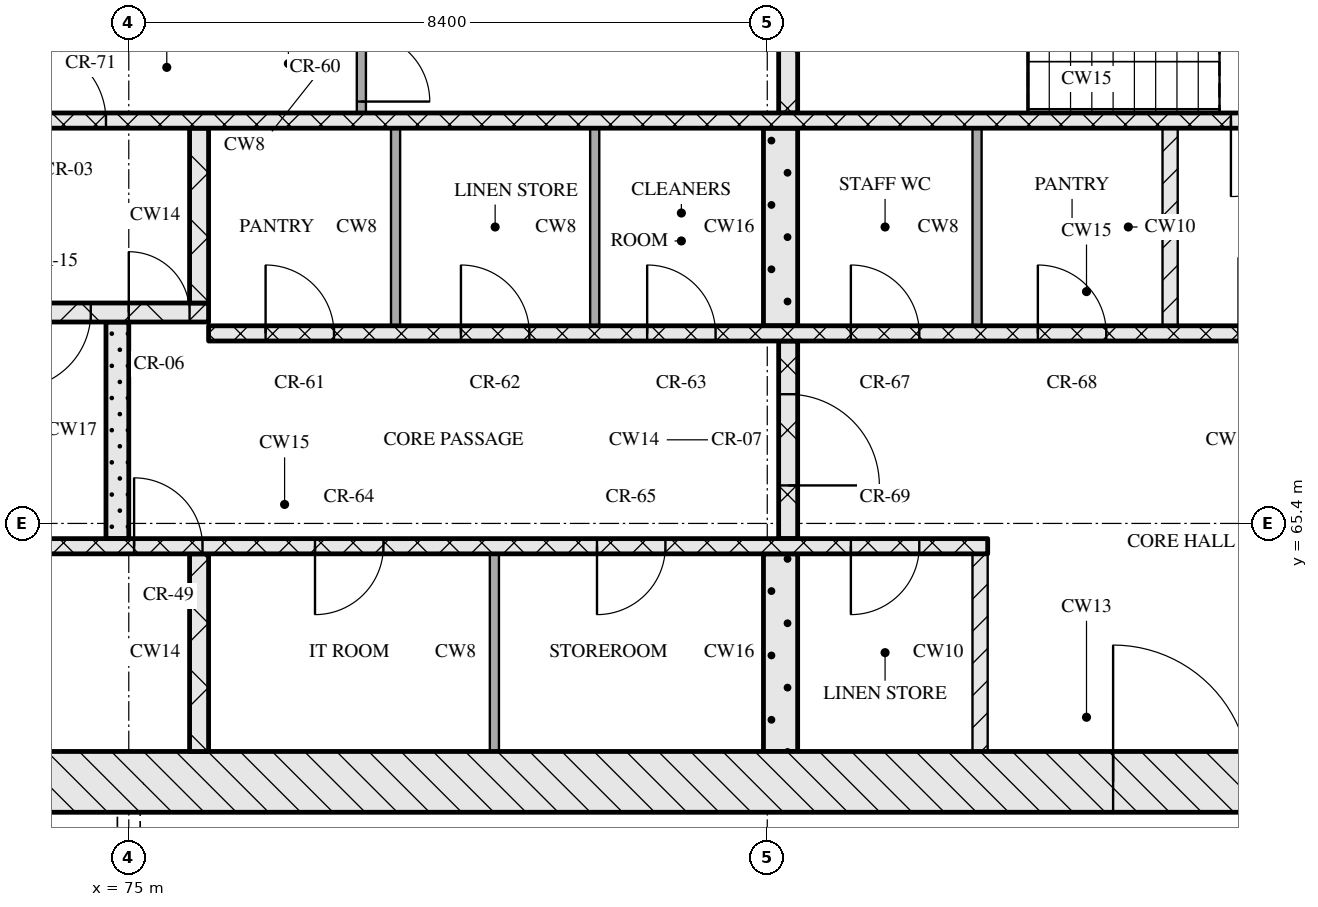
"""IFC4 building model, lengths in metres.
Left out: names, types, materials, properties, quantities, classifications, styles, units other than length and angle.
Written with IfcOpenShell. Run it as: python <this file> out.ifc"""

import sys

from ifc_helpers import new_model, si_unit, direction, frame, frame_2d, origin, place, context, subcontext, project, spatial, rectangle, extrude, element, fill, save


model = new_model("IFC4")
c1 = context("Model", 3, precision=1e-05, world=origin(), true_north=direction((0.0, 1.0)))
c2 = subcontext(c1, "Body", "Model", "MODEL_VIEW")
j1 = project(units=[si_unit("LENGTHUNIT", "METRE"), si_unit("PLANEANGLEUNIT", "RADIAN")], contexts=[c1])
p1 = place(None, origin())
s1 = spatial("IfcSite", under=j1, at=p1, CompositionType="ELEMENT")
p2 = place(p1, origin())
s2 = spatial("IfcBuilding", under=s1, at=p2, CompositionType="ELEMENT")
p3 = place(p2, frame((0.0, 0.0, 179.85)))
s3 = spatial("IfcBuildingStorey", under=s2, at=p3, CompositionType="ELEMENT", Elevation=179.85)
p4 = place(p3, frame((67.0, 62.0, 0.0), z_axis=(0.0, 0.0, 1.0), x_axis=(1.0, 0.0, 0.0)))
e1 = element("IfcWall", 1, at=p4, inside=s3, PredefinedType="SOLIDWALL", context=c2, shape_type="SweptSolid", body=[
    extrude(rectangle(XDim=41.2, YDim=0.8, at=frame_2d((20.6, 0.0))), origin(), (0.0, 0.0, 1.0), 3.32),
])
p5 = place(p4, frame((20.95, 0.0, 0.0)))
e2 = element("IfcOpeningElement", 2, at=p5, cuts=e1, PredefinedType="OPENING", context=c2, shape_type="SweptSolid", body=[
    extrude(rectangle(XDim=1.8, YDim=2.1, at=frame_2d((0.9, 1.05))), frame((0.0, 0.41, 0.0), z_axis=(0.0, -1.0, 0.0), x_axis=(1.0, 0.0, 0.0)), (0.0, 0.0, 1.0), 0.82),
])
p6 = place(p3, frame((75.925, 62.4, 0.0), z_axis=(0.0, 0.0, 1.0), x_axis=(0.0, 1.0, 0.0)))
e3 = element("IfcWall", 3, at=p6, inside=s3, PredefinedType="SOLIDWALL", context=c2, shape_type="SweptSolid", body=[
    extrude(rectangle(XDim=2.6, YDim=0.25, at=frame_2d((1.3, 0.0))), origin(), (0.0, 0.0, 1.0), 3.32),
])
p7 = place(p3, frame((79.81, 62.4, 0.0), z_axis=(0.0, 0.0, 1.0), x_axis=(0.0, 1.0, 0.0)))
e4 = element("IfcWall", 4, at=p7, inside=s3, PredefinedType="PARTITIONING", context=c2, shape_type="SweptSolid", body=[
    extrude(rectangle(XDim=2.6, YDim=0.12, at=frame_2d((1.3, 0.0))), origin(), (0.0, 0.0, 1.0), 3.32),
])
p8 = place(p3, frame((83.575, 62.4, 0.0), z_axis=(0.0, 0.0, 1.0), x_axis=(0.0, 1.0, 0.0)))
e5 = element("IfcWall", 5, at=p8, inside=s3, PredefinedType="SOLIDWALL", context=c2, shape_type="SweptSolid", body=[
    extrude(rectangle(XDim=2.6, YDim=0.45, at=frame_2d((1.3, 0.0))), origin(), (0.0, 0.0, 1.0), 3.32),
])
p9 = place(p3, frame((86.2, 62.4, 0.0), z_axis=(0.0, 0.0, 1.0), x_axis=(0.0, 1.0, 0.0)))
e6 = element("IfcWall", 6, at=p9, inside=s3, PredefinedType="PARTITIONING", context=c2, shape_type="SweptSolid", body=[
    extrude(rectangle(XDim=2.6, YDim=0.2, at=frame_2d((1.3, 0.0))), origin(), (0.0, 0.0, 1.0), 3.32),
])
p10 = place(p3, frame((67.8, 65.1, 0.0), z_axis=(0.0, 0.0, 1.0), x_axis=(1.0, 0.0, 0.0)))
e7 = element("IfcWall", 7, at=p10, inside=s3, PredefinedType="SOLIDWALL", context=c2, shape_type="SweptSolid", body=[
    extrude(rectangle(XDim=18.5, YDim=0.2, at=frame_2d((9.25, 0.0))), origin(), (0.0, 0.0, 1.0), 3.32),
])
p11 = place(p10, frame((7.27, 0.0, 0.0)))
e8 = element("IfcOpeningElement", 8, at=p11, cuts=e7, PredefinedType="OPENING", context=c2, shape_type="SweptSolid", body=[
    extrude(rectangle(XDim=0.9, YDim=2.1, at=frame_2d((0.45, 1.05))), frame((0.0, 0.11, 0.0), z_axis=(0.0, -1.0, 0.0), x_axis=(1.0, 0.0, 0.0)), (0.0, 0.0, 1.0), 0.22),
])
p12 = place(p10, frame((9.65, 0.0, 0.0)))
e9 = element("IfcOpeningElement", 9, at=p12, cuts=e7, PredefinedType="OPENING", context=c2, shape_type="SweptSolid", body=[
    extrude(rectangle(XDim=0.9, YDim=2.1, at=frame_2d((0.45, 1.05))), frame((0.0, 0.11, 0.0), z_axis=(0.0, -1.0, 0.0), x_axis=(1.0, 0.0, 0.0)), (0.0, 0.0, 1.0), 0.22),
])
p13 = place(p10, frame((13.36, 0.0, 0.0)))
e10 = element("IfcOpeningElement", 10, at=p13, cuts=e7, PredefinedType="OPENING", context=c2, shape_type="SweptSolid", body=[
    extrude(rectangle(XDim=0.9, YDim=2.1, at=frame_2d((0.45, 1.05))), frame((0.0, 0.11, 0.0), z_axis=(0.0, -1.0, 0.0), x_axis=(1.0, 0.0, 0.0)), (0.0, 0.0, 1.0), 0.22),
])
p14 = place(p10, frame((16.7, 0.0, 0.0)))
e11 = element("IfcOpeningElement", 11, at=p14, cuts=e7, PredefinedType="OPENING", context=c2, shape_type="SweptSolid", body=[
    extrude(rectangle(XDim=0.9, YDim=2.1, at=frame_2d((0.45, 1.05))), frame((0.0, 0.11, 0.0), z_axis=(0.0, -1.0, 0.0), x_axis=(1.0, 0.0, 0.0)), (0.0, 0.0, 1.0), 0.22),
])
p15 = place(p3, frame((74.85, 65.2, 0.0), z_axis=(0.0, 0.0, 1.0), x_axis=(0.0, 1.0, 0.0)))
e12 = element("IfcWall", 12, at=p15, inside=s3, PredefinedType="SOLIDWALL", context=c2, shape_type="SweptSolid", body=[
    extrude(rectangle(XDim=2.85, YDim=0.3, at=frame_2d((1.425, 0.0))), origin(), (0.0, 0.0, 1.0), 3.32),
])
p16 = place(p3, frame((83.675, 65.2, 0.0), z_axis=(0.0, 0.0, 1.0), x_axis=(0.0, 1.0, 0.0)))
e13 = element("IfcWall", 13, at=p16, inside=s3, PredefinedType="SOLIDWALL", context=c2, shape_type="SweptSolid", body=[
    extrude(rectangle(XDim=2.6, YDim=0.25, at=frame_2d((1.3, 0.0))), origin(), (0.0, 0.0, 1.0), 3.32),
])
p17 = place(p16, frame((0.7, 0.0, 0.0)))
e14 = element("IfcOpeningElement", 14, at=p17, cuts=e13, PredefinedType="OPENING", context=c2, shape_type="SweptSolid", body=[
    extrude(rectangle(XDim=1.2, YDim=2.1, at=frame_2d((0.6, 1.05))), frame((0.0, 0.135, 0.0), z_axis=(0.0, -1.0, 0.0), x_axis=(1.0, 0.0, 0.0)), (0.0, 0.0, 1.0), 0.27),
])
p18 = place(p3, frame((76.05, 67.9, 0.0), z_axis=(0.0, 0.0, 1.0), x_axis=(1.0, 0.0, 0.0)))
e15 = element("IfcWall", 15, at=p18, inside=s3, PredefinedType="SOLIDWALL", context=c2, shape_type="SweptSolid", body=[
    extrude(rectangle(XDim=23.1, YDim=0.2, at=frame_2d((11.55, 0.0))), origin(), (0.0, 0.0, 1.0), 3.32),
])
p19 = place(p18, frame((0.75, 0.0, 0.0)))
e16 = element("IfcOpeningElement", 16, at=p19, cuts=e15, PredefinedType="OPENING", context=c2, shape_type="SweptSolid", body=[
    extrude(rectangle(XDim=0.9, YDim=2.1, at=frame_2d((0.45, 1.05))), frame((0.0, 0.11, 0.0), z_axis=(0.0, -1.0, 0.0), x_axis=(1.0, 0.0, 0.0)), (0.0, 0.0, 1.0), 0.22),
])
p20 = place(p18, frame((3.32, 0.0, 0.0)))
e17 = element("IfcOpeningElement", 17, at=p20, cuts=e15, PredefinedType="OPENING", context=c2, shape_type="SweptSolid", body=[
    extrude(rectangle(XDim=0.9, YDim=2.1, at=frame_2d((0.45, 1.05))), frame((0.0, 0.11, 0.0), z_axis=(0.0, -1.0, 0.0), x_axis=(1.0, 0.0, 0.0)), (0.0, 0.0, 1.0), 0.22),
])
p21 = place(p18, frame((5.77, 0.0, 0.0)))
e18 = element("IfcOpeningElement", 18, at=p21, cuts=e15, PredefinedType="OPENING", context=c2, shape_type="SweptSolid", body=[
    extrude(rectangle(XDim=0.9, YDim=2.1, at=frame_2d((0.45, 1.05))), frame((0.0, 0.11, 0.0), z_axis=(0.0, -1.0, 0.0), x_axis=(1.0, 0.0, 0.0)), (0.0, 0.0, 1.0), 0.22),
])
p22 = place(p18, frame((8.45, 0.0, 0.0)))
e19 = element("IfcOpeningElement", 19, at=p22, cuts=e15, PredefinedType="OPENING", context=c2, shape_type="SweptSolid", body=[
    extrude(rectangle(XDim=0.9, YDim=2.1, at=frame_2d((0.45, 1.05))), frame((0.0, 0.11, 0.0), z_axis=(0.0, -1.0, 0.0), x_axis=(1.0, 0.0, 0.0)), (0.0, 0.0, 1.0), 0.22),
])
p23 = place(p18, frame((10.91, 0.0, 0.0)))
e20 = element("IfcOpeningElement", 20, at=p23, cuts=e15, PredefinedType="OPENING", context=c2, shape_type="SweptSolid", body=[
    extrude(rectangle(XDim=0.9, YDim=2.1, at=frame_2d((0.45, 1.05))), frame((0.0, 0.11, 0.0), z_axis=(0.0, -1.0, 0.0), x_axis=(1.0, 0.0, 0.0)), (0.0, 0.0, 1.0), 0.22),
])
p24 = place(p18, frame((13.55, 0.0, 0.0)))
e21 = element("IfcOpeningElement", 21, at=p24, cuts=e15, PredefinedType="OPENING", context=c2, shape_type="SweptSolid", body=[
    extrude(rectangle(XDim=1.0, YDim=2.1, at=frame_2d((0.5, 1.05))), frame((0.0, 0.11, 0.0), z_axis=(0.0, -1.0, 0.0), x_axis=(1.0, 0.0, 0.0)), (0.0, 0.0, 1.0), 0.22),
])
p25 = place(p18, frame((16.2, 0.0, 0.0)))
e22 = element("IfcOpeningElement", 22, at=p25, cuts=e15, PredefinedType="OPENING", context=c2, shape_type="SweptSolid", body=[
    extrude(rectangle(XDim=1.1, YDim=2.1, at=frame_2d((0.55, 1.05))), frame((0.0, 0.11, 0.0), z_axis=(0.0, -1.0, 0.0), x_axis=(1.0, 0.0, 0.0)), (0.0, 0.0, 1.0), 0.22),
])
p26 = place(p18, frame((18.7, 0.0, 0.0)))
e23 = element("IfcOpeningElement", 23, at=p26, cuts=e15, PredefinedType="OPENING", context=c2, shape_type="SweptSolid", body=[
    extrude(rectangle(XDim=1.1, YDim=2.1, at=frame_2d((0.55, 1.05))), frame((0.0, 0.11, 0.0), z_axis=(0.0, -1.0, 0.0), x_axis=(1.0, 0.0, 0.0)), (0.0, 0.0, 1.0), 0.22),
])
p27 = place(p18, frame((21.2, 0.0, 0.0)))
e24 = element("IfcOpeningElement", 24, at=p27, cuts=e15, PredefinedType="OPENING", context=c2, shape_type="SweptSolid", body=[
    extrude(rectangle(XDim=1.1, YDim=2.1, at=frame_2d((0.55, 1.05))), frame((0.0, 0.11, 0.0), z_axis=(0.0, -1.0, 0.0), x_axis=(1.0, 0.0, 0.0)), (0.0, 0.0, 1.0), 0.22),
])
for number, where, z_axis, x_axis in (
    (25, (78.51, 68.0, 0.0), (0.0, 0.0, 1.0), (0.0, 1.0, 0.0)),
    (26, (81.13, 68.0, 0.0), (0.0, 0.0, 1.0), (0.0, 1.0, 0.0)),
):
    element("IfcWall", number, at=place(p3, frame(where, z_axis=z_axis, x_axis=x_axis)), inside=s3, PredefinedType="PARTITIONING", context=c2, shape_type="SweptSolid", body=[
        extrude(rectangle(XDim=2.6, YDim=0.12, at=frame_2d((1.3, 0.0))), origin(), (0.0, 0.0, 1.0), 3.32),
    ])
p28 = place(p3, frame((83.575, 68.0, 0.0), z_axis=(0.0, 0.0, 1.0), x_axis=(0.0, 1.0, 0.0)))
e27 = element("IfcWall", 27, at=p28, inside=s3, PredefinedType="SOLIDWALL", context=c2, shape_type="SweptSolid", body=[
    extrude(rectangle(XDim=2.6, YDim=0.45, at=frame_2d((1.3, 0.0))), origin(), (0.0, 0.0, 1.0), 3.32),
])
p29 = place(p3, frame((86.16, 68.0, 0.0), z_axis=(0.0, 0.0, 1.0), x_axis=(0.0, 1.0, 0.0)))
e28 = element("IfcWall", 28, at=p29, inside=s3, PredefinedType="PARTITIONING", context=c2, shape_type="SweptSolid", body=[
    extrude(rectangle(XDim=2.6, YDim=0.12, at=frame_2d((1.3, 0.0))), origin(), (0.0, 0.0, 1.0), 3.32),
])
p30 = place(p3, frame((88.7, 68.0, 0.0), z_axis=(0.0, 0.0, 1.0), x_axis=(0.0, 1.0, 0.0)))
e29 = element("IfcWall", 29, at=p30, inside=s3, PredefinedType="PARTITIONING", context=c2, shape_type="SweptSolid", body=[
    extrude(rectangle(XDim=2.6, YDim=0.2, at=frame_2d((1.3, 0.0))), origin(), (0.0, 0.0, 1.0), 3.32),
])
p31 = place(p3, frame((67.8, 68.175, 0.0), z_axis=(0.0, 0.0, 1.0), x_axis=(1.0, 0.0, 0.0)))
e30 = element("IfcWall", 30, at=p31, inside=s3, PredefinedType="SOLIDWALL", context=c2, shape_type="SweptSolid", body=[
    extrude(rectangle(XDim=8.25, YDim=0.25, at=frame_2d((4.125, 0.0))), origin(), (0.0, 0.0, 1.0), 3.32),
])
p32 = place(p31, frame((5.7, 0.0, 0.0)))
e31 = element("IfcOpeningElement", 31, at=p32, cuts=e30, PredefinedType="OPENING", context=c2, shape_type="SweptSolid", body=[
    extrude(rectangle(XDim=1.0, YDim=2.1, at=frame_2d((0.5, 1.05))), frame((0.0, 0.135, 0.0), z_axis=(0.0, -1.0, 0.0), x_axis=(1.0, 0.0, 0.0)), (0.0, 0.0, 1.0), 0.27),
])
p33 = place(p31, frame((7.2, 0.0, 0.0)))
e32 = element("IfcOpeningElement", 32, at=p33, cuts=e30, PredefinedType="OPENING", context=c2, shape_type="SweptSolid", body=[
    extrude(rectangle(XDim=0.8, YDim=2.1, at=frame_2d((0.4, 1.05))), frame((0.0, 0.135, 0.0), z_axis=(0.0, -1.0, 0.0), x_axis=(1.0, 0.0, 0.0)), (0.0, 0.0, 1.0), 0.27),
])
p34 = place(p3, frame((75.925, 68.3, 0.0), z_axis=(0.0, 0.0, 1.0), x_axis=(0.0, 1.0, 0.0)))
e33 = element("IfcWall", 33, at=p34, inside=s3, PredefinedType="SOLIDWALL", context=c2, shape_type="SweptSolid", body=[
    extrude(rectangle(XDim=2.3, YDim=0.25, at=frame_2d((1.15, 0.0))), origin(), (0.0, 0.0, 1.0), 3.32),
])
p35 = place(p3, frame((67.8, 70.7, 0.0), z_axis=(0.0, 0.0, 1.0), x_axis=(1.0, 0.0, 0.0)))
e34 = element("IfcWall", 34, at=p35, inside=s3, PredefinedType="SOLIDWALL", context=c2, shape_type="SweptSolid", body=[
    extrude(rectangle(XDim=39.6, YDim=0.2, at=frame_2d((19.8, 0.0))), origin(), (0.0, 0.0, 1.0), 3.32),
])
p36 = place(p35, frame((0.65, 0.0, 0.0)))
e35 = element("IfcOpeningElement", 35, at=p36, cuts=e34, PredefinedType="OPENING", context=c2, shape_type="SweptSolid", body=[
    extrude(rectangle(XDim=1.1, YDim=2.1, at=frame_2d((0.55, 1.05))), frame((0.0, 0.11, 0.0), z_axis=(0.0, -1.0, 0.0), x_axis=(1.0, 0.0, 0.0)), (0.0, 0.0, 1.0), 0.22),
])
p37 = place(p35, frame((3.25, 0.0, 0.0)))
e36 = element("IfcOpeningElement", 36, at=p37, cuts=e34, PredefinedType="OPENING", context=c2, shape_type="SweptSolid", body=[
    extrude(rectangle(XDim=1.1, YDim=2.1, at=frame_2d((0.55, 1.05))), frame((0.0, 0.11, 0.0), z_axis=(0.0, -1.0, 0.0), x_axis=(1.0, 0.0, 0.0)), (0.0, 0.0, 1.0), 0.22),
])
p38 = place(p35, frame((5.9, 0.0, 0.0)))
e37 = element("IfcOpeningElement", 37, at=p38, cuts=e34, PredefinedType="OPENING", context=c2, shape_type="SweptSolid", body=[
    extrude(rectangle(XDim=1.0, YDim=2.1, at=frame_2d((0.5, 1.05))), frame((0.0, 0.11, 0.0), z_axis=(0.0, -1.0, 0.0), x_axis=(1.0, 0.0, 0.0)), (0.0, 0.0, 1.0), 0.22),
])
p39 = place(p35, frame((21.7, 0.0, 0.0)))
e38 = element("IfcOpeningElement", 38, at=p39, cuts=e34, PredefinedType="OPENING", context=c2, shape_type="SweptSolid", body=[
    extrude(rectangle(XDim=1.0, YDim=2.1, at=frame_2d((0.5, 1.05))), frame((0.0, 0.11, 0.0), z_axis=(0.0, -1.0, 0.0), x_axis=(1.0, 0.0, 0.0)), (0.0, 0.0, 1.0), 0.22),
])
p40 = place(p35, frame((32.7, 0.0, 0.0)))
e39 = element("IfcOpeningElement", 39, at=p40, cuts=e34, PredefinedType="OPENING", context=c2, shape_type="SweptSolid", body=[
    extrude(rectangle(XDim=1.0, YDim=2.1, at=frame_2d((0.5, 1.05))), frame((0.0, 0.11, 0.0), z_axis=(0.0, -1.0, 0.0), x_axis=(1.0, 0.0, 0.0)), (0.0, 0.0, 1.0), 0.22),
])
p41 = place(p35, frame((35.25, 0.0, 0.0)))
e40 = element("IfcOpeningElement", 40, at=p41, cuts=e34, PredefinedType="OPENING", context=c2, shape_type="SweptSolid", body=[
    extrude(rectangle(XDim=1.1, YDim=2.1, at=frame_2d((0.55, 1.05))), frame((0.0, 0.11, 0.0), z_axis=(0.0, -1.0, 0.0), x_axis=(1.0, 0.0, 0.0)), (0.0, 0.0, 1.0), 0.22),
])
p42 = place(p35, frame((37.85, 0.0, 0.0)))
e41 = element("IfcOpeningElement", 41, at=p42, cuts=e34, PredefinedType="OPENING", context=c2, shape_type="SweptSolid", body=[
    extrude(rectangle(XDim=1.1, YDim=2.1, at=frame_2d((0.55, 1.05))), frame((0.0, 0.11, 0.0), z_axis=(0.0, -1.0, 0.0), x_axis=(1.0, 0.0, 0.0)), (0.0, 0.0, 1.0), 0.22),
])
p43 = place(p3, frame((78.06, 70.8, 0.0), z_axis=(0.0, 0.0, 1.0), x_axis=(0.0, 1.0, 0.0)))
e42 = element("IfcWall", 42, at=p43, inside=s3, PredefinedType="PARTITIONING", context=c2, shape_type="SweptSolid", body=[
    extrude(rectangle(XDim=1.2, YDim=0.12, at=frame_2d((0.6, 0.0))), origin(), (0.0, 0.0, 1.0), 3.32),
])
p44 = place(p43, frame((0.15, 0.0, 0.0)))
e43 = element("IfcOpeningElement", 43, at=p44, cuts=e42, PredefinedType="OPENING", context=c2, shape_type="SweptSolid", body=[
    extrude(rectangle(XDim=0.9, YDim=2.1, at=frame_2d((0.45, 1.05))), frame((0.0, 0.07, 0.0), z_axis=(0.0, -1.0, 0.0), x_axis=(1.0, 0.0, 0.0)), (0.0, 0.0, 1.0), 0.14),
])
p45 = place(p3, frame((83.675, 70.8, 0.0), z_axis=(0.0, 0.0, 1.0), x_axis=(0.0, 1.0, 0.0)))
e44 = element("IfcWall", 44, at=p45, inside=s3, PredefinedType="SOLIDWALL", context=c2, shape_type="SweptSolid", body=[
    extrude(rectangle(XDim=2.95, YDim=0.25, at=frame_2d((1.475, 0.0))), origin(), (0.0, 0.0, 1.0), 3.32),
])
p46 = place(p5, origin())
e45 = element("IfcDoor", 45, at=p46, inside=s3, OperationType="DOUBLE_DOOR_SINGLE_SWING", PredefinedType="DOOR", context=c2, shape_type="SweptSolid", body=[
    extrude(rectangle(XDim=1.8, YDim=2.1, at=frame_2d((0.9, 1.05))), frame((0.0, 0.025, 0.0), z_axis=(0.0, -1.0, 0.0), x_axis=(1.0, 0.0, 0.0)), (0.0, 0.0, 1.0), 0.05),
])
fill(e2, e45)
p47 = place(p11, origin())
e46 = element("IfcDoor", 46, at=p47, inside=s3, OperationType="SINGLE_SWING_LEFT", PredefinedType="DOOR", context=c2, shape_type="SweptSolid", body=[
    extrude(rectangle(XDim=0.9, YDim=2.1, at=frame_2d((0.45, 1.05))), frame((0.0, 0.025, 0.0), z_axis=(0.0, -1.0, 0.0), x_axis=(1.0, 0.0, 0.0)), (0.0, 0.0, 1.0), 0.05),
])
fill(e8, e46)
p48 = place(p12, origin())
e47 = element("IfcDoor", 47, at=p48, inside=s3, OperationType="SINGLE_SWING_RIGHT", PredefinedType="DOOR", context=c2, shape_type="SweptSolid", body=[
    extrude(rectangle(XDim=0.9, YDim=2.1, at=frame_2d((0.45, 1.05))), frame((0.0, 0.025, 0.0), z_axis=(0.0, -1.0, 0.0), x_axis=(1.0, 0.0, 0.0)), (0.0, 0.0, 1.0), 0.05),
])
fill(e9, e47)
p49 = place(p13, origin())
e48 = element("IfcDoor", 48, at=p49, inside=s3, OperationType="SINGLE_SWING_RIGHT", PredefinedType="DOOR", context=c2, shape_type="SweptSolid", body=[
    extrude(rectangle(XDim=0.9, YDim=2.1, at=frame_2d((0.45, 1.05))), frame((0.0, 0.025, 0.0), z_axis=(0.0, -1.0, 0.0), x_axis=(1.0, 0.0, 0.0)), (0.0, 0.0, 1.0), 0.05),
])
fill(e10, e48)
p50 = place(p14, origin())
e49 = element("IfcDoor", 49, at=p50, inside=s3, OperationType="SINGLE_SWING_RIGHT", PredefinedType="DOOR", context=c2, shape_type="SweptSolid", body=[
    extrude(rectangle(XDim=0.9, YDim=2.1, at=frame_2d((0.45, 1.05))), frame((0.0, 0.025, 0.0), z_axis=(0.0, -1.0, 0.0), x_axis=(1.0, 0.0, 0.0)), (0.0, 0.0, 1.0), 0.05),
])
fill(e11, e49)
p51 = place(p17, origin())
e50 = element("IfcDoor", 50, at=p51, inside=s3, OperationType="SINGLE_SWING_RIGHT", PredefinedType="DOOR", context=c2, shape_type="SweptSolid", body=[
    extrude(rectangle(XDim=1.2, YDim=2.1, at=frame_2d((0.6, 1.05))), frame((0.0, 0.025, 0.0), z_axis=(0.0, -1.0, 0.0), x_axis=(1.0, 0.0, 0.0)), (0.0, 0.0, 1.0), 0.05),
])
fill(e14, e50)
p52 = place(p19, origin())
e51 = element("IfcDoor", 51, at=p52, inside=s3, OperationType="SINGLE_SWING_LEFT", PredefinedType="DOOR", context=c2, shape_type="SweptSolid", body=[
    extrude(rectangle(XDim=0.9, YDim=2.1, at=frame_2d((0.45, 1.05))), frame((0.0, 0.025, 0.0), z_axis=(0.0, -1.0, 0.0), x_axis=(1.0, 0.0, 0.0)), (0.0, 0.0, 1.0), 0.05),
])
fill(e16, e51)
p53 = place(p20, origin())
e52 = element("IfcDoor", 52, at=p53, inside=s3, OperationType="SINGLE_SWING_LEFT", PredefinedType="DOOR", context=c2, shape_type="SweptSolid", body=[
    extrude(rectangle(XDim=0.9, YDim=2.1, at=frame_2d((0.45, 1.05))), frame((0.0, 0.025, 0.0), z_axis=(0.0, -1.0, 0.0), x_axis=(1.0, 0.0, 0.0)), (0.0, 0.0, 1.0), 0.05),
])
fill(e17, e52)
p54 = place(p21, origin())
e53 = element("IfcDoor", 53, at=p54, inside=s3, OperationType="SINGLE_SWING_LEFT", PredefinedType="DOOR", context=c2, shape_type="SweptSolid", body=[
    extrude(rectangle(XDim=0.9, YDim=2.1, at=frame_2d((0.45, 1.05))), frame((0.0, 0.025, 0.0), z_axis=(0.0, -1.0, 0.0), x_axis=(1.0, 0.0, 0.0)), (0.0, 0.0, 1.0), 0.05),
])
fill(e18, e53)
p55 = place(p22, origin())
e54 = element("IfcDoor", 54, at=p55, inside=s3, OperationType="SINGLE_SWING_LEFT", PredefinedType="DOOR", context=c2, shape_type="SweptSolid", body=[
    extrude(rectangle(XDim=0.9, YDim=2.1, at=frame_2d((0.45, 1.05))), frame((0.0, 0.025, 0.0), z_axis=(0.0, -1.0, 0.0), x_axis=(1.0, 0.0, 0.0)), (0.0, 0.0, 1.0), 0.05),
])
fill(e19, e54)
p56 = place(p23, origin())
e55 = element("IfcDoor", 55, at=p56, inside=s3, OperationType="SINGLE_SWING_LEFT", PredefinedType="DOOR", context=c2, shape_type="SweptSolid", body=[
    extrude(rectangle(XDim=0.9, YDim=2.1, at=frame_2d((0.45, 1.05))), frame((0.0, 0.025, 0.0), z_axis=(0.0, -1.0, 0.0), x_axis=(1.0, 0.0, 0.0)), (0.0, 0.0, 1.0), 0.05),
])
fill(e20, e55)
p57 = place(p32, origin())
e56 = element("IfcDoor", 56, at=p57, inside=s3, OperationType="SINGLE_SWING_RIGHT", PredefinedType="DOOR", context=c2, shape_type="SweptSolid", body=[
    extrude(rectangle(XDim=1.0, YDim=2.1, at=frame_2d((0.5, 1.05))), frame((0.0, 0.025, 0.0), z_axis=(0.0, -1.0, 0.0), x_axis=(1.0, 0.0, 0.0)), (0.0, 0.0, 1.0), 0.05),
])
fill(e31, e56)
p58 = place(p33, origin())
e57 = element("IfcDoor", 57, at=p58, inside=s3, OperationType="SINGLE_SWING_LEFT", PredefinedType="DOOR", context=c2, shape_type="SweptSolid", body=[
    extrude(rectangle(XDim=0.8, YDim=2.1, at=frame_2d((0.4, 1.05))), frame((0.0, 0.025, 0.0), z_axis=(0.0, -1.0, 0.0), x_axis=(1.0, 0.0, 0.0)), (0.0, 0.0, 1.0), 0.05),
])
fill(e32, e57)
p59 = place(p38, origin())
e58 = element("IfcDoor", 58, at=p59, inside=s3, OperationType="SINGLE_SWING_LEFT", PredefinedType="DOOR", context=c2, shape_type="SweptSolid", body=[
    extrude(rectangle(XDim=1.0, YDim=2.1, at=frame_2d((0.5, 1.05))), frame((0.0, 0.025, 0.0), z_axis=(0.0, -1.0, 0.0), x_axis=(1.0, 0.0, 0.0)), (0.0, 0.0, 1.0), 0.05),
])
fill(e37, e58)
p60 = place(p39, origin())
e59 = element("IfcDoor", 59, at=p60, inside=s3, OperationType="SINGLE_SWING_RIGHT", PredefinedType="DOOR", context=c2, shape_type="SweptSolid", body=[
    extrude(rectangle(XDim=1.0, YDim=2.1, at=frame_2d((0.5, 1.05))), frame((0.0, 0.025, 0.0), z_axis=(0.0, -1.0, 0.0), x_axis=(1.0, 0.0, 0.0)), (0.0, 0.0, 1.0), 0.05),
])
fill(e38, e59)
p61 = place(p44, origin())
e60 = element("IfcDoor", 60, at=p61, inside=s3, OperationType="SINGLE_SWING_RIGHT", PredefinedType="DOOR", context=c2, shape_type="SweptSolid", body=[
    extrude(rectangle(XDim=0.9, YDim=2.1, at=frame_2d((0.45, 1.05))), frame((0.0, 0.025, 0.0), z_axis=(0.0, -1.0, 0.0), x_axis=(1.0, 0.0, 0.0)), (0.0, 0.0, 1.0), 0.05),
])
fill(e43, e60)
save(model, sys.argv[1])
